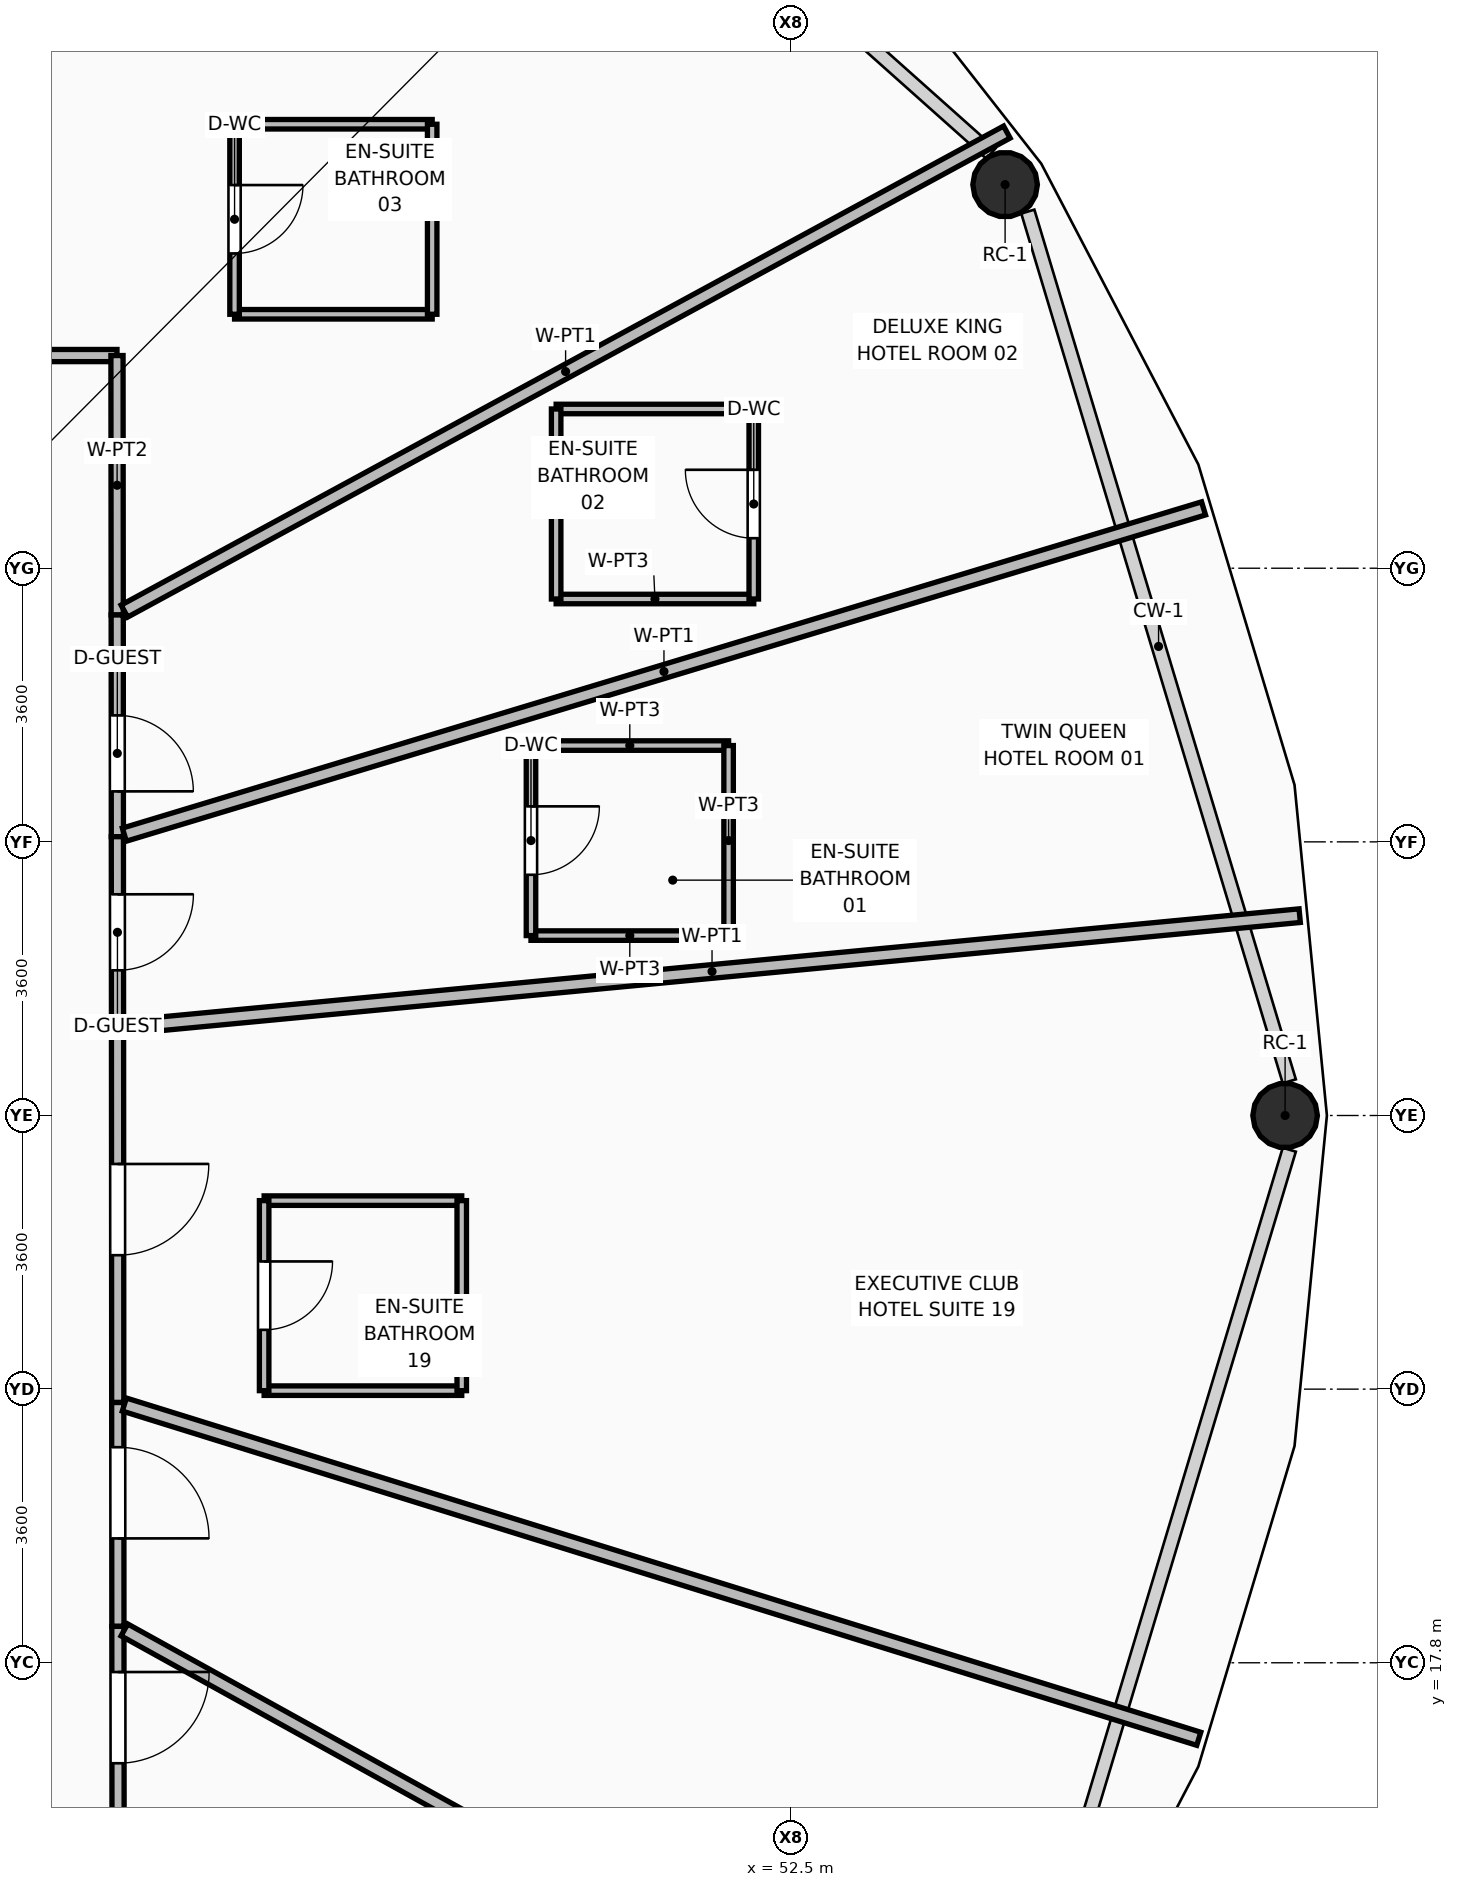
"""IFC4 building model, lengths in metres.
Left out: names, types, materials, properties, quantities, classifications, styles, units other than length and angle.
Written with IfcOpenShell. Run it as: python <this file> out.ifc"""

import sys

from ifc_helpers import new_model, si_unit, direction, frame, frame_2d, origin, origin_2d, place, context, subcontext, project, spatial, rectangle, hollow_circle, extrude, element, fill, save


model = new_model("IFC4")
c1 = context("Model", 3, precision=1e-05, world=origin(), true_north=direction((0.0, 1.0)))
c2 = subcontext(c1, "Body", "Model", "MODEL_VIEW")
j1 = project(units=[si_unit("LENGTHUNIT", "METRE"), si_unit("PLANEANGLEUNIT", "RADIAN")], contexts=[c1])
p1 = place(None, origin())
s1 = spatial("IfcSite", under=j1, at=p1, CompositionType="ELEMENT")
p2 = place(p1, origin())
s2 = spatial("IfcBuilding", under=s1, at=p2, CompositionType="ELEMENT")
p3 = place(p2, frame((0.0, 0.0, 79.5)))
s3 = spatial("IfcBuildingStorey", under=s2, at=p3, CompositionType="ELEMENT", Elevation=79.5)
for number, where, z_axis, x_axis in (
    (1, (59.0, 25.0, 0.0), (0.0, 0.0, 1.0), (1.0, 0.0, 0.0)),
    (2, (55.316, 37.247, 0.0), (0.0, 0.0, 1.0), (1.0, 0.0, 0.0)),
):
    element("IfcColumn", number, at=place(p3, frame(where, z_axis=z_axis, x_axis=x_axis)), inside=s3, PredefinedType="COLUMN", context=c2, shape_type="SweptSolid", body=[
        extrude(hollow_circle(Radius=0.425, WallThickness=0.04, at=origin_2d()), origin(), (0.0, 0.0, 1.0), 3.57),
    ])
p4 = place(p3, frame((38.966, 34.998, 0.0), z_axis=(0.0, 0.0, 1.0), x_axis=(1.0, 0.0, 0.0)))
e3 = element("IfcWall", 3, at=p4, inside=s3, PredefinedType="PARTITIONING", context=c2, shape_type="SweptSolid", body=[
    extrude(rectangle(XDim=4.665, YDim=0.16, at=frame_2d((2.333, 0.0))), origin(), (0.0, 0.0, 1.0), 2.928),
])
p5 = place(p4, frame((0.609, 0.0, 0.0)))
e4 = element("IfcOpeningElement", 4, at=p5, cuts=e3, PredefinedType="OPENING", context=c2, shape_type="SweptSolid", body=[
    extrude(rectangle(XDim=1.2, YDim=2.1, at=frame_2d((0.6, 1.05))), frame((0.0, 0.09, 0.0), z_axis=(0.0, -1.0, 0.0), x_axis=(1.0, 0.0, 0.0)), (0.0, 0.0, 1.0), 0.18),
])
p6 = place(p3, frame((43.631, 34.998, 0.0), z_axis=(0.0, 0.0, 1.0), x_axis=(0.000858368782, -0.999999631601, 0.0)))
e5 = element("IfcWall", 5, at=p6, inside=s3, PredefinedType="PARTITIONING", context=c2, shape_type="SweptSolid", body=[
    extrude(rectangle(XDim=3.413, YDim=0.16, at=frame_2d((1.707, 0.0))), origin(), (0.0, 0.0, 1.0), 2.928),
])
p7 = place(p3, frame((43.634, 31.585, 0.0), z_axis=(0.0, 0.0, 1.0), x_axis=(0.000669567978, -0.999999775839, 0.0)))
e6 = element("IfcWall", 6, at=p7, inside=s3, PredefinedType="PARTITIONING", context=c2, shape_type="SweptSolid", body=[
    extrude(rectangle(XDim=2.917, YDim=0.16, at=frame_2d((1.458, 0.0))), origin(), (0.0, 0.0, 1.0), 3.55),
])
p8 = place(p7, frame((1.321, 0.0, 0.0)))
e7 = element("IfcOpeningElement", 7, at=p8, cuts=e6, PredefinedType="OPENING", context=c2, shape_type="SweptSolid", body=[
    extrude(rectangle(XDim=1.0, YDim=2.1, at=frame_2d((0.5, 1.05))), frame((0.0, 0.09, 0.0), z_axis=(0.0, -1.0, 0.0), x_axis=(1.0, 0.0, 0.0)), (0.0, 0.0, 1.0), 0.18),
])
p9 = place(p3, frame((43.636, 28.668, 0.0), z_axis=(0.0, 0.0, 1.0), x_axis=(0.00077632194, -0.999999698662, 0.0)))
e8 = element("IfcWall", 8, at=p9, inside=s3, PredefinedType="PARTITIONING", context=c2, shape_type="SweptSolid", body=[
    extrude(rectangle(XDim=2.516, YDim=0.16, at=frame_2d((1.258, 0.0))), origin(), (0.0, 0.0, 1.0), 3.55),
])
p10 = place(p9, frame((0.758, 0.0, 0.0)))
e9 = element("IfcOpeningElement", 9, at=p10, cuts=e8, PredefinedType="OPENING", context=c2, shape_type="SweptSolid", body=[
    extrude(rectangle(XDim=1.0, YDim=2.1, at=frame_2d((0.5, 1.05))), frame((0.0, 0.09, 0.0), z_axis=(0.0, -1.0, 0.0), x_axis=(1.0, 0.0, 0.0)), (0.0, 0.0, 1.0), 0.18),
])
p11 = place(p3, frame((43.638, 26.152, 0.0), z_axis=(0.0, 0.0, 1.0), x_axis=(0.000644042472, -0.999999792605, 0.0)))
e10 = element("IfcWall", 10, at=p11, inside=s3, PredefinedType="PARTITIONING", context=c2, shape_type="SweptSolid", body=[
    extrude(rectangle(XDim=4.928, YDim=0.16, at=frame_2d((2.464, 0.0))), origin(), (0.0, 0.0, 1.0), 2.928),
])
p12 = place(p11, frame((1.79, 0.0, 0.0)))
e11 = element("IfcOpeningElement", 11, at=p12, cuts=e10, PredefinedType="OPENING", context=c2, shape_type="SweptSolid", body=[
    extrude(rectangle(XDim=1.2, YDim=2.1, at=frame_2d((0.6, 1.05))), frame((0.0, 0.09, 0.0), z_axis=(0.0, -1.0, 0.0), x_axis=(1.0, 0.0, 0.0)), (0.0, 0.0, 1.0), 0.18),
])
p13 = place(p3, frame((43.641, 21.224, 0.0), z_axis=(0.0, 0.0, 1.0), x_axis=(0.0006631848, -0.999999780093, 0.0)))
e12 = element("IfcWall", 12, at=p13, inside=s3, PredefinedType="PARTITIONING", context=c2, shape_type="SweptSolid", body=[
    extrude(rectangle(XDim=2.945, YDim=0.16, at=frame_2d((1.473, 0.0))), origin(), (0.0, 0.0, 1.0), 2.928),
])
p14 = place(p13, frame((0.588, 0.0, 0.0)))
e13 = element("IfcOpeningElement", 13, at=p14, cuts=e12, PredefinedType="OPENING", context=c2, shape_type="SweptSolid", body=[
    extrude(rectangle(XDim=1.2, YDim=2.1, at=frame_2d((0.6, 1.05))), frame((0.0, 0.09, 0.0), z_axis=(0.0, -1.0, 0.0), x_axis=(1.0, 0.0, 0.0)), (0.0, 0.0, 1.0), 0.18),
])
p15 = place(p3, frame((43.643, 18.279, 0.0), z_axis=(0.0, 0.0, 1.0), x_axis=(0.000756429436, -0.999999713907, 0.0)))
e14 = element("IfcWall", 14, at=p15, inside=s3, PredefinedType="PARTITIONING", context=c2, shape_type="SweptSolid", body=[
    extrude(rectangle(XDim=3.873, YDim=0.16, at=frame_2d((1.937, 0.0))), origin(), (0.0, 0.0, 1.0), 2.928),
])
p16 = place(p15, frame((0.601, 0.0, 0.0)))
e15 = element("IfcOpeningElement", 15, at=p16, cuts=e14, PredefinedType="OPENING", context=c2, shape_type="SweptSolid", body=[
    extrude(rectangle(XDim=1.2, YDim=2.1, at=frame_2d((0.6, 1.05))), frame((0.0, 0.09, 0.0), z_axis=(0.0, -1.0, 0.0), x_axis=(1.0, 0.0, 0.0)), (0.0, 0.0, 1.0), 0.18),
])
p17 = place(p3, frame((43.728, 26.161, 0.0), z_axis=(0.0, 0.0, 1.0), x_axis=(0.995524176843, 0.094507213062, 0.0)))
e16 = element("IfcWall", 16, at=p17, inside=s3, PredefinedType="PARTITIONING", context=c2, shape_type="SweptSolid", body=[
    extrude(rectangle(XDim=15.533, YDim=0.18, at=frame_2d((7.767, 0.0))), origin(), (0.0, 0.0, 1.0), 2.775),
])
p18 = place(p3, frame((43.728, 28.695, 0.0), z_axis=(0.0, 0.0, 1.0), x_axis=(0.957224891777, 0.289344961183, 0.0)))
e17 = element("IfcWall", 17, at=p18, inside=s3, PredefinedType="PARTITIONING", context=c2, shape_type="SweptSolid", body=[
    extrude(rectangle(XDim=14.833, YDim=0.18, at=frame_2d((7.417, 0.0))), origin(), (0.0, 0.0, 1.0), 2.775),
])
p19 = place(p3, frame((43.728, 31.636, 0.0), z_axis=(0.0, 0.0, 1.0), x_axis=(0.878890179317, 0.477024163643, 0.0)))
e18 = element("IfcWall", 18, at=p19, inside=s3, PredefinedType="PARTITIONING", context=c2, shape_type="SweptSolid", body=[
    extrude(rectangle(XDim=13.211, YDim=0.18, at=frame_2d((6.605, 0.0))), origin(), (0.0, 0.0, 1.0), 2.775),
])
p20 = place(p3, frame((39.026, 35.078, 0.0), z_axis=(0.0, 0.0, 1.0), x_axis=(0.598366758348, 0.801222330258, 0.0)))
e19 = element("IfcWall", 19, at=p20, inside=s3, PredefinedType="PARTITIONING", context=c2, shape_type="SweptSolid", body=[
    extrude(rectangle(XDim=13.236, YDim=0.18, at=frame_2d((6.618, 0.0))), origin(), (0.0, 0.0, 1.0), 2.775),
])
p21 = place(p3, frame((43.728, 18.232, 0.0), z_axis=(0.0, 0.0, 1.0), x_axis=(0.874929134989, -0.484250977022, 0.0)))
e20 = element("IfcWall", 20, at=p21, inside=s3, PredefinedType="PARTITIONING", context=c2, shape_type="SweptSolid", body=[
    extrude(rectangle(XDim=13.111, YDim=0.18, at=frame_2d((6.555, 0.0))), origin(), (0.0, 0.0, 1.0), 2.775),
])
p22 = place(p3, frame((43.728, 21.197, 0.0), z_axis=(0.0, 0.0, 1.0), x_axis=(0.954873823144, -0.297011753766, 0.0)))
e21 = element("IfcWall", 21, at=p22, inside=s3, PredefinedType="PARTITIONING", context=c2, shape_type="SweptSolid", body=[
    extrude(rectangle(XDim=14.804, YDim=0.18, at=frame_2d((7.402, 0.0))), origin(), (0.0, 0.0, 1.0), 2.775),
])
for number, where, z_axis, x_axis in (
    (22, (49.078, 27.367, 0.0), (0.0, 0.0, 1.0), (1.0, 0.0, 0.0)),
    (23, (49.078, 29.867, 0.0), (0.0, 0.0, 1.0), (1.0, 0.0, 0.0)),
):
    element("IfcWall", number, at=place(p3, frame(where, z_axis=z_axis, x_axis=x_axis)), inside=s3, PredefinedType="PARTITIONING", context=c2, shape_type="SweptSolid", body=[
        extrude(rectangle(XDim=2.6, YDim=0.125, at=frame_2d((1.3, 0.0))), origin(), (0.0, 0.0, 1.0), 3.55),
    ])
p23 = place(p3, frame((49.078, 27.367, 0.0), z_axis=(0.0, 0.0, 1.0), x_axis=(0.0, 1.0, 0.0)))
e24 = element("IfcWall", 24, at=p23, inside=s3, PredefinedType="PARTITIONING", context=c2, shape_type="SweptSolid", body=[
    extrude(rectangle(XDim=2.5, YDim=0.125, at=frame_2d((1.25, 0.0))), origin(), (0.0, 0.0, 1.0), 3.55),
])
p24 = place(p23, frame((0.8, 0.0, 0.0)))
e25 = element("IfcOpeningElement", 25, at=p24, cuts=e24, PredefinedType="OPENING", context=c2, shape_type="SweptSolid", body=[
    extrude(rectangle(XDim=0.9, YDim=2.1, at=frame_2d((0.45, 1.05))), frame((0.0, 0.073, 0.0), z_axis=(0.0, -1.0, 0.0), x_axis=(1.0, 0.0, 0.0)), (0.0, 0.0, 1.0), 0.145),
])
p25 = place(p3, frame((51.678, 27.367, 0.0), z_axis=(0.0, 0.0, 1.0), x_axis=(0.0, 1.0, 0.0)))
e26 = element("IfcWall", 26, at=p25, inside=s3, PredefinedType="PARTITIONING", context=c2, shape_type="SweptSolid", body=[
    extrude(rectangle(XDim=2.5, YDim=0.125, at=frame_2d((1.25, 0.0))), origin(), (0.0, 0.0, 1.0), 3.55),
])
for number, where, z_axis, x_axis in (
    (27, (49.409, 31.795, 0.0), (0.0, 0.0, 1.0), (1.0, 0.0, 0.0)),
    (28, (49.409, 34.295, 0.0), (0.0, 0.0, 1.0), (1.0, 0.0, 0.0)),
):
    element("IfcWall", number, at=place(p3, frame(where, z_axis=z_axis, x_axis=x_axis)), inside=s3, PredefinedType="PARTITIONING", context=c2, shape_type="SweptSolid", body=[
        extrude(rectangle(XDim=2.6, YDim=0.125, at=frame_2d((1.3, 0.0))), origin(), (0.0, 0.0, 1.0), 3.55),
    ])
p26 = place(p3, frame((49.409, 31.795, 0.0), z_axis=(0.0, 0.0, 1.0), x_axis=(0.0, 1.0, 0.0)))
e29 = element("IfcWall", 29, at=p26, inside=s3, PredefinedType="PARTITIONING", context=c2, shape_type="SweptSolid", body=[
    extrude(rectangle(XDim=2.5, YDim=0.125, at=frame_2d((1.25, 0.0))), origin(), (0.0, 0.0, 1.0), 3.55),
])
p27 = place(p3, frame((52.009, 31.795, 0.0), z_axis=(0.0, 0.0, 1.0), x_axis=(0.0, 1.0, 0.0)))
e30 = element("IfcWall", 30, at=p27, inside=s3, PredefinedType="PARTITIONING", context=c2, shape_type="SweptSolid", body=[
    extrude(rectangle(XDim=2.5, YDim=0.125, at=frame_2d((1.25, 0.0))), origin(), (0.0, 0.0, 1.0), 3.55),
])
p28 = place(p27, frame((0.8, 0.0, 0.0)))
e31 = element("IfcOpeningElement", 31, at=p28, cuts=e30, PredefinedType="OPENING", context=c2, shape_type="SweptSolid", body=[
    extrude(rectangle(XDim=0.9, YDim=2.1, at=frame_2d((0.45, 1.05))), frame((0.0, 0.073, 0.0), z_axis=(0.0, -1.0, 0.0), x_axis=(1.0, 0.0, 0.0)), (0.0, 0.0, 1.0), 0.145),
])
for number, where, z_axis, x_axis in (
    (32, (45.178, 35.541, 0.0), (0.0, 0.0, 1.0), (1.0, 0.0, 0.0)),
    (33, (45.178, 38.041, 0.0), (0.0, 0.0, 1.0), (1.0, 0.0, 0.0)),
):
    element("IfcWall", number, at=place(p3, frame(where, z_axis=z_axis, x_axis=x_axis)), inside=s3, PredefinedType="PARTITIONING", context=c2, shape_type="SweptSolid", body=[
        extrude(rectangle(XDim=2.6, YDim=0.125, at=frame_2d((1.3, 0.0))), origin(), (0.0, 0.0, 1.0), 3.55),
    ])
p29 = place(p3, frame((45.178, 35.541, 0.0), z_axis=(0.0, 0.0, 1.0), x_axis=(0.0, 1.0, 0.0)))
e34 = element("IfcWall", 34, at=p29, inside=s3, PredefinedType="PARTITIONING", context=c2, shape_type="SweptSolid", body=[
    extrude(rectangle(XDim=2.5, YDim=0.125, at=frame_2d((1.25, 0.0))), origin(), (0.0, 0.0, 1.0), 3.55),
])
p30 = place(p29, frame((0.8, 0.0, 0.0)))
e35 = element("IfcOpeningElement", 35, at=p30, cuts=e34, PredefinedType="OPENING", context=c2, shape_type="SweptSolid", body=[
    extrude(rectangle(XDim=0.9, YDim=2.1, at=frame_2d((0.45, 1.05))), frame((0.0, 0.073, 0.0), z_axis=(0.0, -1.0, 0.0), x_axis=(1.0, 0.0, 0.0)), (0.0, 0.0, 1.0), 0.145),
])
p31 = place(p3, frame((47.778, 35.541, 0.0), z_axis=(0.0, 0.0, 1.0), x_axis=(0.0, 1.0, 0.0)))
e36 = element("IfcWall", 36, at=p31, inside=s3, PredefinedType="PARTITIONING", context=c2, shape_type="SweptSolid", body=[
    extrude(rectangle(XDim=2.5, YDim=0.125, at=frame_2d((1.25, 0.0))), origin(), (0.0, 0.0, 1.0), 3.55),
])
p32 = place(p3, frame((45.567, 21.38, 0.0), z_axis=(0.0, 0.0, 1.0), x_axis=(1.0, 0.0, 0.0)))
e37 = element("IfcWall", 37, at=p32, inside=s3, PredefinedType="PARTITIONING", context=c2, shape_type="SweptSolid", body=[
    extrude(rectangle(XDim=2.6, YDim=0.125, at=frame_2d((1.3, 0.0))), origin(), (0.0, 0.0, 1.0), 2.928),
])
p33 = place(p3, frame((45.567, 23.88, 0.0), z_axis=(0.0, 0.0, 1.0), x_axis=(1.0, 0.0, 0.0)))
e38 = element("IfcWall", 38, at=p33, inside=s3, PredefinedType="PARTITIONING", context=c2, shape_type="SweptSolid", body=[
    extrude(rectangle(XDim=2.6, YDim=0.125, at=frame_2d((1.3, 0.0))), origin(), (0.0, 0.0, 1.0), 3.55),
])
p34 = place(p3, frame((45.567, 21.38, 0.0), z_axis=(0.0, 0.0, 1.0), x_axis=(0.0, 1.0, 0.0)))
e39 = element("IfcWall", 39, at=p34, inside=s3, PredefinedType="PARTITIONING", context=c2, shape_type="SweptSolid", body=[
    extrude(rectangle(XDim=2.5, YDim=0.125, at=frame_2d((1.25, 0.0))), origin(), (0.0, 0.0, 1.0), 2.928),
])
p35 = place(p34, frame((0.8, 0.0, 0.0)))
e40 = element("IfcOpeningElement", 40, at=p35, cuts=e39, PredefinedType="OPENING", context=c2, shape_type="SweptSolid", body=[
    extrude(rectangle(XDim=0.9, YDim=2.1, at=frame_2d((0.45, 1.05))), frame((0.0, 0.073, 0.0), z_axis=(0.0, -1.0, 0.0), x_axis=(1.0, 0.0, 0.0)), (0.0, 0.0, 1.0), 0.145),
])
p36 = place(p3, frame((48.167, 21.38, 0.0), z_axis=(0.0, 0.0, 1.0), x_axis=(0.0, 1.0, 0.0)))
e41 = element("IfcWall", 41, at=p36, inside=s3, PredefinedType="PARTITIONING", context=c2, shape_type="SweptSolid", body=[
    extrude(rectangle(XDim=2.5, YDim=0.125, at=frame_2d((1.25, 0.0))), origin(), (0.0, 0.0, 1.0), 2.928),
])
p37 = place(p24, frame((0.9, 0.0, 0.0), z_axis=(0.0, 0.0, 1.0), x_axis=(-1.0, 0.0, 0.0)))
e42 = element("IfcDoor", 42, at=p37, inside=s3, OperationType="SINGLE_SWING_LEFT", PredefinedType="DOOR", context=c2, shape_type="SweptSolid", body=[
    extrude(rectangle(XDim=0.9, YDim=2.1, at=frame_2d((0.45, 1.05))), frame((0.0, 0.025, 0.0), z_axis=(0.0, -1.0, 0.0), x_axis=(1.0, 0.0, 0.0)), (0.0, 0.0, 1.0), 0.05),
])
fill(e25, e42)
p38 = place(p10, origin())
e43 = element("IfcDoor", 43, at=p38, inside=s3, OperationType="SINGLE_SWING_LEFT", PredefinedType="DOOR", context=c2, shape_type="SweptSolid", body=[
    extrude(rectangle(XDim=1.0, YDim=2.1, at=frame_2d((0.5, 1.05))), frame((0.0, 0.025, 0.0), z_axis=(0.0, -1.0, 0.0), x_axis=(1.0, 0.0, 0.0)), (0.0, 0.0, 1.0), 0.05),
])
fill(e9, e43)
p39 = place(p28, origin())
e44 = element("IfcDoor", 44, at=p39, inside=s3, OperationType="SINGLE_SWING_RIGHT", PredefinedType="DOOR", context=c2, shape_type="SweptSolid", body=[
    extrude(rectangle(XDim=0.9, YDim=2.1, at=frame_2d((0.45, 1.05))), frame((0.0, 0.025, 0.0), z_axis=(0.0, -1.0, 0.0), x_axis=(1.0, 0.0, 0.0)), (0.0, 0.0, 1.0), 0.05),
])
fill(e31, e44)
p40 = place(p8, origin())
e45 = element("IfcDoor", 45, at=p40, inside=s3, OperationType="SINGLE_SWING_RIGHT", PredefinedType="DOOR", context=c2, shape_type="SweptSolid", body=[
    extrude(rectangle(XDim=1.0, YDim=2.1, at=frame_2d((0.5, 1.05))), frame((0.0, 0.025, 0.0), z_axis=(0.0, -1.0, 0.0), x_axis=(1.0, 0.0, 0.0)), (0.0, 0.0, 1.0), 0.05),
])
fill(e7, e45)
p41 = place(p30, frame((0.9, 0.0, 0.0), z_axis=(0.0, 0.0, 1.0), x_axis=(-1.0, 0.0, 0.0)))
e46 = element("IfcDoor", 46, at=p41, inside=s3, OperationType="SINGLE_SWING_LEFT", PredefinedType="DOOR", context=c2, shape_type="SweptSolid", body=[
    extrude(rectangle(XDim=0.9, YDim=2.1, at=frame_2d((0.45, 1.05))), frame((0.0, 0.025, 0.0), z_axis=(0.0, -1.0, 0.0), x_axis=(1.0, 0.0, 0.0)), (0.0, 0.0, 1.0), 0.05),
])
fill(e35, e46)
p42 = place(p16, origin())
e47 = element("IfcDoor", 47, at=p42, inside=s3, OperationType="SINGLE_SWING_LEFT", PredefinedType="DOOR", context=c2, shape_type="SweptSolid", body=[
    extrude(rectangle(XDim=1.2, YDim=2.1, at=frame_2d((0.6, 1.05))), frame((0.0, 0.025, 0.0), z_axis=(0.0, -1.0, 0.0), x_axis=(1.0, 0.0, 0.0)), (0.0, 0.0, 1.0), 0.05),
])
fill(e15, e47)
p43 = place(p14, origin())
e48 = element("IfcDoor", 48, at=p43, inside=s3, OperationType="SINGLE_SWING_RIGHT", PredefinedType="DOOR", context=c2, shape_type="SweptSolid", body=[
    extrude(rectangle(XDim=1.2, YDim=2.1, at=frame_2d((0.6, 1.05))), frame((0.0, 0.025, 0.0), z_axis=(0.0, -1.0, 0.0), x_axis=(1.0, 0.0, 0.0)), (0.0, 0.0, 1.0), 0.05),
])
fill(e13, e48)
p44 = place(p35, frame((0.9, 0.0, 0.0), z_axis=(0.0, 0.0, 1.0), x_axis=(-1.0, 0.0, 0.0)))
e49 = element("IfcDoor", 49, at=p44, inside=s3, OperationType="SINGLE_SWING_LEFT", PredefinedType="DOOR", context=c2, shape_type="SweptSolid", body=[
    extrude(rectangle(XDim=0.9, YDim=2.1, at=frame_2d((0.45, 1.05))), frame((0.0, 0.025, 0.0), z_axis=(0.0, -1.0, 0.0), x_axis=(1.0, 0.0, 0.0)), (0.0, 0.0, 1.0), 0.05),
])
fill(e40, e49)
p45 = place(p12, origin())
e50 = element("IfcDoor", 50, at=p45, inside=s3, OperationType="SINGLE_SWING_LEFT", PredefinedType="DOOR", context=c2, shape_type="SweptSolid", body=[
    extrude(rectangle(XDim=1.2, YDim=2.1, at=frame_2d((0.6, 1.05))), frame((0.0, 0.025, 0.0), z_axis=(0.0, -1.0, 0.0), x_axis=(1.0, 0.0, 0.0)), (0.0, 0.0, 1.0), 0.05),
])
fill(e11, e50)
save(model, sys.argv[1])
